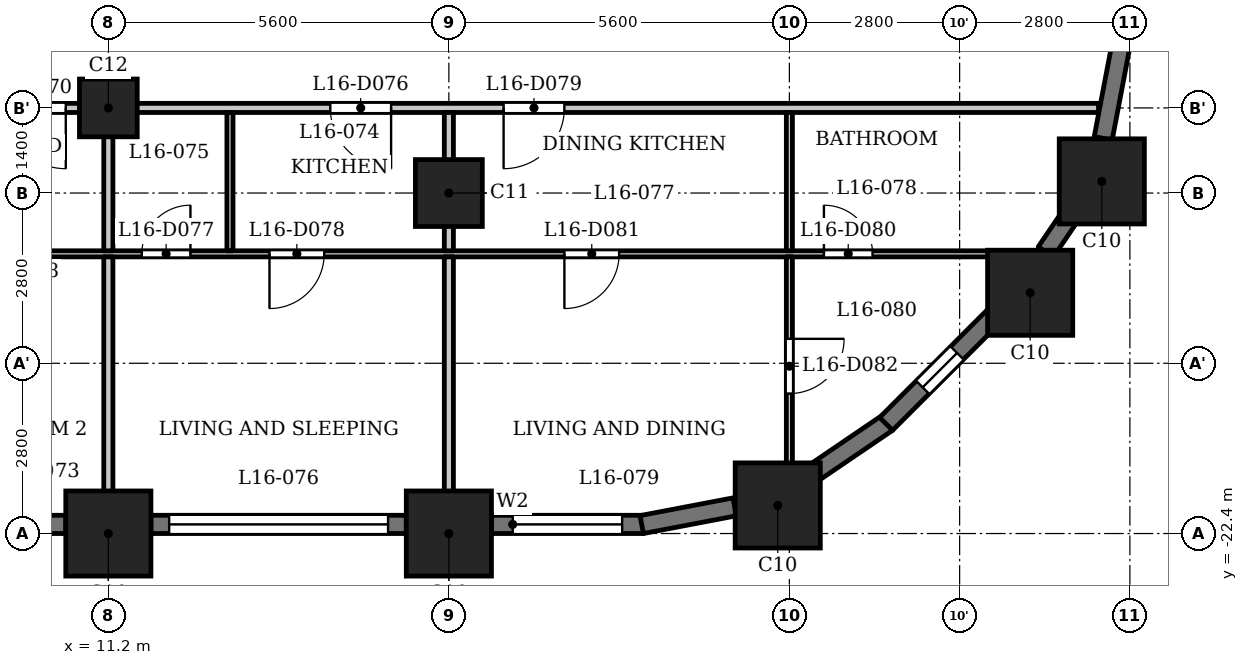
"""IFC4 building model, lengths in metres.
Left out: names, types, materials, properties, quantities, classifications, styles, units other than length and angle.
Written with IfcOpenShell. Run it as: python <this file> out.ifc"""

import sys

from ifc_helpers import new_model, si_unit, direction, frame, frame_2d, origin, origin_2d, place, context, subcontext, project, spatial, rectangle, extrude, element, fill, save


model = new_model("IFC4")
c1 = context("Model", 3, precision=1e-05, world=origin(), true_north=direction((0.0, 1.0)))
c2 = subcontext(c1, "Body", "Model", "MODEL_VIEW")
j1 = project(units=[si_unit("LENGTHUNIT", "METRE"), si_unit("PLANEANGLEUNIT", "RADIAN")], contexts=[c1])
p1 = place(None, origin())
s1 = spatial("IfcSite", under=j1, at=p1, CompositionType="ELEMENT")
p2 = place(p1, origin())
s2 = spatial("IfcBuilding", under=s1, at=p2, CompositionType="ELEMENT")
p3 = place(p2, frame((0.0, 0.0, 65.5)))
s3 = spatial("IfcBuildingStorey", under=s2, at=p3, CompositionType="ELEMENT", Elevation=65.5)
for number, where, z_axis, x_axis in (
    (1, (11.2, -22.4, 0.0), (0.0, 0.0, 1.0), (1.0, 0.0, 0.0)),
    (2, (16.8, -22.4, 0.0), (0.0, 0.0, 1.0), (1.0, 0.0, 0.0)),
    (3, (22.209, -21.938, 0.0), (0.0, 0.0, 1.0), (1.0, 0.0, 0.0)),
    (4, (26.36, -18.44, 0.0), (0.0, 0.0, 1.0), (1.0, 0.0, 0.0)),
    (5, (27.538, -16.609, 0.0), (0.0, 0.0, 1.0), (1.0, 0.0, 0.0)),
):
    element("IfcColumn", number, at=place(p3, frame(where, z_axis=z_axis, x_axis=x_axis)), inside=s3, PredefinedType="COLUMN", context=c2, shape_type="SweptSolid", body=[
        extrude(rectangle(XDim=1.4, YDim=1.4, at=origin_2d()), origin(), (0.0, 0.0, 1.0), 3.5),
    ])
p4 = place(p3, frame((16.8, -16.8, 0.0), z_axis=(0.0, 0.0, 1.0), x_axis=(1.0, 0.0, 0.0)))
e6 = element("IfcColumn", 6, at=p4, inside=s3, PredefinedType="COLUMN", context=c2, shape_type="SweptSolid", body=[
    extrude(rectangle(XDim=1.1, YDim=1.1, at=origin_2d()), origin(), (0.0, 0.0, 1.0), 3.5),
])
p5 = place(p3, frame((11.2, -15.4, 0.0), z_axis=(0.0, 0.0, 1.0), x_axis=(1.0, 0.0, 0.0)))
e7 = element("IfcColumn", 7, at=p5, inside=s3, PredefinedType="COLUMN", context=c2, shape_type="SweptSolid", body=[
    extrude(rectangle(XDim=0.95, YDim=0.95, at=origin_2d()), origin(), (0.0, 0.0, 1.0), 3.5),
])
p6 = place(p3, frame((6.3, -22.25, 0.0), z_axis=(0.0, 0.0, 1.0), x_axis=(1.0, 0.0, 0.0)))
e8 = element("IfcWall", 8, at=p6, inside=s3, PredefinedType="SOLIDWALL", context=c2, shape_type="SweptSolid", body=[
    extrude(rectangle(XDim=4.2, YDim=0.3, at=frame_2d((2.1, 0.0))), origin(), (0.0, 0.0, 1.0), 2.35),
])
p7 = place(p6, frame((0.413, 0.0, 0.6)))
e9 = element("IfcOpeningElement", 9, at=p7, cuts=e8, PredefinedType="OPENING", context=c2, shape_type="SweptSolid", body=[
    extrude(rectangle(XDim=1.2, YDim=1.55, at=frame_2d((0.6, 0.775))), frame((0.0, 0.16, 0.0), z_axis=(0.0, -1.0, 0.0), x_axis=(1.0, 0.0, 0.0)), (0.0, 0.0, 1.0), 0.32),
])
p8 = place(p6, frame((2.587, 0.0, 0.6)))
e10 = element("IfcOpeningElement", 10, at=p8, cuts=e8, PredefinedType="OPENING", context=c2, shape_type="SweptSolid", body=[
    extrude(rectangle(XDim=1.2, YDim=1.55, at=frame_2d((0.6, 0.775))), frame((0.0, 0.16, 0.0), z_axis=(0.0, -1.0, 0.0), x_axis=(1.0, 0.0, 0.0)), (0.0, 0.0, 1.0), 0.32),
])
p9 = place(p3, frame((11.9, -22.25, 0.0), z_axis=(0.0, 0.0, 1.0), x_axis=(1.0, 0.0, 0.0)))
e11 = element("IfcWall", 11, at=p9, inside=s3, PredefinedType="SOLIDWALL", context=c2, shape_type="SweptSolid", body=[
    extrude(rectangle(XDim=4.2, YDim=0.3, at=frame_2d((2.1, 0.0))), origin(), (0.0, 0.0, 1.0), 2.35),
])
p10 = place(p9, frame((0.3, 0.0, 1.2)))
e12 = element("IfcOpeningElement", 12, at=p10, cuts=e11, PredefinedType="OPENING", context=c2, shape_type="SweptSolid", body=[
    extrude(rectangle(XDim=3.6, YDim=0.95, at=frame_2d((1.8, 0.475))), frame((0.0, 0.16, 0.0), z_axis=(0.0, -1.0, 0.0), x_axis=(1.0, 0.0, 0.0)), (0.0, 0.0, 1.0), 0.32),
])
p11 = place(p3, frame((17.5, -22.25, 0.0), z_axis=(0.0, 0.0, 1.0), x_axis=(1.0, 0.0, 0.0)))
e13 = element("IfcWall", 13, at=p11, inside=s3, PredefinedType="SOLIDWALL", context=c2, shape_type="SweptSolid", body=[
    extrude(rectangle(XDim=2.5, YDim=0.3, at=frame_2d((1.25, 0.0))), origin(), (0.0, 0.0, 1.0), 2.35),
])
p12 = place(p11, frame((0.35, 0.0, 0.9)))
e14 = element("IfcOpeningElement", 14, at=p12, cuts=e13, PredefinedType="OPENING", context=c2, shape_type="SweptSolid", body=[
    extrude(rectangle(XDim=1.8, YDim=1.25, at=frame_2d((0.9, 0.625))), frame((0.0, 0.16, 0.0), z_axis=(0.0, -1.0, 0.0), x_axis=(1.0, 0.0, 0.0)), (0.0, 0.0, 1.0), 0.32),
])
p13 = place(p3, frame((19.972, -22.253, 0.0), z_axis=(0.0, 0.0, 1.0), x_axis=(0.982297345734, 0.187328386968, 0.0)))
e15 = element("IfcWall", 15, at=p13, inside=s3, PredefinedType="SOLIDWALL", context=c2, shape_type="SweptSolid", body=[
    extrude(rectangle(XDim=1.556, YDim=0.3, at=frame_2d((0.778, 0.0))), origin(), (0.0, 0.0, 1.0), 2.35),
])
p14 = place(p3, frame((22.726, -21.454, 0.0), z_axis=(0.0, 0.0, 1.0), x_axis=(0.827019875346, 0.562172683241, 0.0)))
e16 = element("IfcWall", 16, at=p14, inside=s3, PredefinedType="SOLIDWALL", context=c2, shape_type="SweptSolid", body=[
    extrude(rectangle(XDim=1.556, YDim=0.3, at=frame_2d((0.778, 0.0))), origin(), (0.0, 0.0, 1.0), 2.35),
])
p15 = place(p3, frame((23.991, -20.597, 0.0), z_axis=(0.0, 0.0, 1.0), x_axis=(0.707106781187, 0.707106781187, 0.0)))
e17 = element("IfcWall", 17, at=p15, inside=s3, PredefinedType="SOLIDWALL", context=c2, shape_type="SweptSolid", body=[
    extrude(rectangle(XDim=2.5, YDim=0.3, at=frame_2d((1.25, 0.0))), origin(), (0.0, 0.0, 1.0), 2.35),
])
p16 = place(p15, frame((0.85, 0.0, 0.6)))
e18 = element("IfcOpeningElement", 18, at=p16, cuts=e17, PredefinedType="OPENING", context=c2, shape_type="SweptSolid", body=[
    extrude(rectangle(XDim=0.8, YDim=1.55, at=frame_2d((0.4, 0.775))), frame((0.0, 0.16, 0.0), z_axis=(0.0, -1.0, 0.0), x_axis=(1.0, 0.0, 0.0)), (0.0, 0.0, 1.0), 0.32),
])
p17 = place(p3, frame((26.617, -17.769, 0.0), z_axis=(0.0, 0.0, 1.0), x_axis=(0.562000651531, 0.827136788977, 0.0)))
e19 = element("IfcWall", 19, at=p17, inside=s3, PredefinedType="SOLIDWALL", context=c2, shape_type="SweptSolid", body=[
    extrude(rectangle(XDim=0.777, YDim=0.3, at=frame_2d((0.389, 0.0))), origin(), (0.0, 0.0, 1.0), 3.2),
])
p18 = place(p3, frame((27.561, -15.9, 0.0), z_axis=(0.0, 0.0, 1.0), x_axis=(0.187328386968, 0.982297345734, 0.0)))
e20 = element("IfcWall", 20, at=p18, inside=s3, PredefinedType="SOLIDWALL", context=c2, shape_type="SweptSolid", body=[
    extrude(rectangle(XDim=1.556, YDim=0.3, at=frame_2d((0.778, 0.0))), origin(), (0.0, 0.0, 1.0), 2.35),
])
p19 = place(p3, frame((-26.394, -17.8, 0.0), z_axis=(0.0, 0.0, 1.0), x_axis=(1.0, 0.0, 0.0)))
e21 = element("IfcWall", 21, at=p19, inside=s3, PredefinedType="PARTITIONING", context=c2, shape_type="SweptSolid", body=[
    extrude(rectangle(XDim=53.034, YDim=0.1, at=frame_2d((26.517, 0.0))), origin(), (0.0, 0.0, 1.0), 3.2),
])
p20 = place(p19, frame((0.794, 0.0, 0.0)))
e22 = element("IfcOpeningElement", 22, at=p20, cuts=e21, PredefinedType="OPENING", context=c2, shape_type="SweptSolid", body=[
    extrude(rectangle(XDim=0.8, YDim=2.1, at=frame_2d((0.4, 1.05))), frame((0.0, 0.06, 0.0), z_axis=(0.0, -1.0, 0.0), x_axis=(1.0, 0.0, 0.0)), (0.0, 0.0, 1.0), 0.12),
])
p21 = place(p19, frame((5.644, 0.0, 0.0)))
e23 = element("IfcOpeningElement", 23, at=p21, cuts=e21, PredefinedType="OPENING", context=c2, shape_type="SweptSolid", body=[
    extrude(rectangle(XDim=0.9, YDim=2.1, at=frame_2d((0.45, 1.05))), frame((0.0, 0.06, 0.0), z_axis=(0.0, -1.0, 0.0), x_axis=(1.0, 0.0, 0.0)), (0.0, 0.0, 1.0), 0.12),
])
p22 = place(p19, frame((10.494, 0.0, 0.0)))
e24 = element("IfcOpeningElement", 24, at=p22, cuts=e21, PredefinedType="OPENING", context=c2, shape_type="SweptSolid", body=[
    extrude(rectangle(XDim=0.8, YDim=2.1, at=frame_2d((0.4, 1.05))), frame((0.0, 0.06, 0.0), z_axis=(0.0, -1.0, 0.0), x_axis=(1.0, 0.0, 0.0)), (0.0, 0.0, 1.0), 0.12),
])
p23 = place(p19, frame((13.844, 0.0, 0.0)))
e25 = element("IfcOpeningElement", 25, at=p23, cuts=e21, PredefinedType="OPENING", context=c2, shape_type="SweptSolid", body=[
    extrude(rectangle(XDim=0.9, YDim=2.1, at=frame_2d((0.45, 1.05))), frame((0.0, 0.06, 0.0), z_axis=(0.0, -1.0, 0.0), x_axis=(1.0, 0.0, 0.0)), (0.0, 0.0, 1.0), 0.12),
])
p24 = place(p19, frame((19.344, 0.0, 0.0)))
e26 = element("IfcOpeningElement", 26, at=p24, cuts=e21, PredefinedType="OPENING", context=c2, shape_type="SweptSolid", body=[
    extrude(rectangle(XDim=0.8, YDim=2.1, at=frame_2d((0.4, 1.05))), frame((0.0, 0.06, 0.0), z_axis=(0.0, -1.0, 0.0), x_axis=(1.0, 0.0, 0.0)), (0.0, 0.0, 1.0), 0.12),
])
p25 = place(p19, frame((16.094, 0.0, 0.0)))
e27 = element("IfcOpeningElement", 27, at=p25, cuts=e21, PredefinedType="OPENING", context=c2, shape_type="SweptSolid", body=[
    extrude(rectangle(XDim=0.9, YDim=2.1, at=frame_2d((0.45, 1.05))), frame((0.0, 0.06, 0.0), z_axis=(0.0, -1.0, 0.0), x_axis=(1.0, 0.0, 0.0)), (0.0, 0.0, 1.0), 0.12),
])
p26 = place(p19, frame((24.944, 0.0, 0.0)))
e28 = element("IfcOpeningElement", 28, at=p26, cuts=e21, PredefinedType="OPENING", context=c2, shape_type="SweptSolid", body=[
    extrude(rectangle(XDim=0.8, YDim=2.1, at=frame_2d((0.4, 1.05))), frame((0.0, 0.06, 0.0), z_axis=(0.0, -1.0, 0.0), x_axis=(1.0, 0.0, 0.0)), (0.0, 0.0, 1.0), 0.12),
])
p27 = place(p19, frame((22.444, 0.0, 0.0)))
e29 = element("IfcOpeningElement", 29, at=p27, cuts=e21, PredefinedType="OPENING", context=c2, shape_type="SweptSolid", body=[
    extrude(rectangle(XDim=0.9, YDim=2.1, at=frame_2d((0.45, 1.05))), frame((0.0, 0.06, 0.0), z_axis=(0.0, -1.0, 0.0), x_axis=(1.0, 0.0, 0.0)), (0.0, 0.0, 1.0), 0.12),
])
p28 = place(p19, frame((26.944, 0.0, 0.0)))
e30 = element("IfcOpeningElement", 30, at=p28, cuts=e21, PredefinedType="OPENING", context=c2, shape_type="SweptSolid", body=[
    extrude(rectangle(XDim=0.8, YDim=2.1, at=frame_2d((0.4, 1.05))), frame((0.0, 0.06, 0.0), z_axis=(0.0, -1.0, 0.0), x_axis=(1.0, 0.0, 0.0)), (0.0, 0.0, 1.0), 0.12),
])
p29 = place(p19, frame((29.794, 0.0, 0.0)))
e31 = element("IfcOpeningElement", 31, at=p29, cuts=e21, PredefinedType="OPENING", context=c2, shape_type="SweptSolid", body=[
    extrude(rectangle(XDim=0.9, YDim=2.1, at=frame_2d((0.45, 1.05))), frame((0.0, 0.06, 0.0), z_axis=(0.0, -1.0, 0.0), x_axis=(1.0, 0.0, 0.0)), (0.0, 0.0, 1.0), 0.12),
])
p30 = place(p19, frame((33.394, 0.0, 0.0)))
e32 = element("IfcOpeningElement", 32, at=p30, cuts=e21, PredefinedType="OPENING", context=c2, shape_type="SweptSolid", body=[
    extrude(rectangle(XDim=0.9, YDim=2.1, at=frame_2d((0.45, 1.05))), frame((0.0, 0.06, 0.0), z_axis=(0.0, -1.0, 0.0), x_axis=(1.0, 0.0, 0.0)), (0.0, 0.0, 1.0), 0.12),
])
p31 = place(p19, frame((34.944, 0.0, 0.0)))
e33 = element("IfcOpeningElement", 33, at=p31, cuts=e21, PredefinedType="OPENING", context=c2, shape_type="SweptSolid", body=[
    extrude(rectangle(XDim=0.9, YDim=2.1, at=frame_2d((0.45, 1.05))), frame((0.0, 0.06, 0.0), z_axis=(0.0, -1.0, 0.0), x_axis=(1.0, 0.0, 0.0)), (0.0, 0.0, 1.0), 0.12),
])
p32 = place(p19, frame((38.144, 0.0, 0.0)))
e34 = element("IfcOpeningElement", 34, at=p32, cuts=e21, PredefinedType="OPENING", context=c2, shape_type="SweptSolid", body=[
    extrude(rectangle(XDim=0.8, YDim=2.1, at=frame_2d((0.4, 1.05))), frame((0.0, 0.06, 0.0), z_axis=(0.0, -1.0, 0.0), x_axis=(1.0, 0.0, 0.0)), (0.0, 0.0, 1.0), 0.12),
])
p33 = place(p19, frame((40.244, 0.0, 0.0)))
e35 = element("IfcOpeningElement", 35, at=p33, cuts=e21, PredefinedType="OPENING", context=c2, shape_type="SweptSolid", body=[
    extrude(rectangle(XDim=0.9, YDim=2.1, at=frame_2d((0.45, 1.05))), frame((0.0, 0.06, 0.0), z_axis=(0.0, -1.0, 0.0), x_axis=(1.0, 0.0, 0.0)), (0.0, 0.0, 1.0), 0.12),
])
p34 = place(p19, frame((49.362, 0.0, 0.0)))
e36 = element("IfcOpeningElement", 36, at=p34, cuts=e21, PredefinedType="OPENING", context=c2, shape_type="SweptSolid", body=[
    extrude(rectangle(XDim=0.8, YDim=2.1, at=frame_2d((0.4, 1.05))), frame((0.0, 0.06, 0.0), z_axis=(0.0, -1.0, 0.0), x_axis=(1.0, 0.0, 0.0)), (0.0, 0.0, 1.0), 0.12),
])
p35 = place(p19, frame((45.094, 0.0, 0.0)))
e37 = element("IfcOpeningElement", 37, at=p35, cuts=e21, PredefinedType="OPENING", context=c2, shape_type="SweptSolid", body=[
    extrude(rectangle(XDim=0.9, YDim=2.1, at=frame_2d((0.45, 1.05))), frame((0.0, 0.06, 0.0), z_axis=(0.0, -1.0, 0.0), x_axis=(1.0, 0.0, 0.0)), (0.0, 0.0, 1.0), 0.12),
])
p36 = place(p3, frame((-27.484, -15.4, 0.0), z_axis=(0.0, 0.0, 1.0), x_axis=(1.0, 0.0, 0.0)))
e38 = element("IfcWall", 38, at=p36, inside=s3, PredefinedType="PARTITIONING", context=c2, shape_type="SweptSolid", body=[
    extrude(rectangle(XDim=54.968, YDim=0.15, at=frame_2d((27.484, 0.0))), origin(), (0.0, 0.0, 1.0), 3.2),
])
p37 = place(p36, frame((5.734, 0.0, 0.0)))
e39 = element("IfcOpeningElement", 39, at=p37, cuts=e38, PredefinedType="OPENING", context=c2, shape_type="SweptSolid", body=[
    extrude(rectangle(XDim=1.0, YDim=2.1, at=frame_2d((0.5, 1.05))), frame((0.0, 0.085, 0.0), z_axis=(0.0, -1.0, 0.0), x_axis=(1.0, 0.0, 0.0)), (0.0, 0.0, 1.0), 0.17),
])
p38 = place(p36, frame((13.934, 0.0, 0.0)))
e40 = element("IfcOpeningElement", 40, at=p38, cuts=e38, PredefinedType="OPENING", context=c2, shape_type="SweptSolid", body=[
    extrude(rectangle(XDim=1.0, YDim=2.1, at=frame_2d((0.5, 1.05))), frame((0.0, 0.085, 0.0), z_axis=(0.0, -1.0, 0.0), x_axis=(1.0, 0.0, 0.0)), (0.0, 0.0, 1.0), 0.17),
])
p39 = place(p36, frame((18.184, 0.0, 0.0)))
e41 = element("IfcOpeningElement", 41, at=p39, cuts=e38, PredefinedType="OPENING", context=c2, shape_type="SweptSolid", body=[
    extrude(rectangle(XDim=1.0, YDim=2.1, at=frame_2d((0.5, 1.05))), frame((0.0, 0.085, 0.0), z_axis=(0.0, -1.0, 0.0), x_axis=(1.0, 0.0, 0.0)), (0.0, 0.0, 1.0), 0.17),
])
p40 = place(p36, frame((22.534, 0.0, 0.0)))
e42 = element("IfcOpeningElement", 42, at=p40, cuts=e38, PredefinedType="OPENING", context=c2, shape_type="SweptSolid", body=[
    extrude(rectangle(XDim=1.0, YDim=2.1, at=frame_2d((0.5, 1.05))), frame((0.0, 0.085, 0.0), z_axis=(0.0, -1.0, 0.0), x_axis=(1.0, 0.0, 0.0)), (0.0, 0.0, 1.0), 0.17),
])
p41 = place(p36, frame((36.984, 0.0, 0.0)))
e43 = element("IfcOpeningElement", 43, at=p41, cuts=e38, PredefinedType="OPENING", context=c2, shape_type="SweptSolid", body=[
    extrude(rectangle(XDim=1.0, YDim=2.1, at=frame_2d((0.5, 1.05))), frame((0.0, 0.085, 0.0), z_axis=(0.0, -1.0, 0.0), x_axis=(1.0, 0.0, 0.0)), (0.0, 0.0, 1.0), 0.17),
])
p42 = place(p36, frame((42.334, 0.0, 0.0)))
e44 = element("IfcOpeningElement", 44, at=p42, cuts=e38, PredefinedType="OPENING", context=c2, shape_type="SweptSolid", body=[
    extrude(rectangle(XDim=1.0, YDim=2.1, at=frame_2d((0.5, 1.05))), frame((0.0, 0.085, 0.0), z_axis=(0.0, -1.0, 0.0), x_axis=(1.0, 0.0, 0.0)), (0.0, 0.0, 1.0), 0.17),
])
p43 = place(p36, frame((45.184, 0.0, 0.0)))
e45 = element("IfcOpeningElement", 45, at=p43, cuts=e38, PredefinedType="OPENING", context=c2, shape_type="SweptSolid", body=[
    extrude(rectangle(XDim=1.0, YDim=2.1, at=frame_2d((0.5, 1.05))), frame((0.0, 0.085, 0.0), z_axis=(0.0, -1.0, 0.0), x_axis=(1.0, 0.0, 0.0)), (0.0, 0.0, 1.0), 0.17),
])
p44 = place(p3, frame((11.2, -23.08, 0.0), z_axis=(0.0, 0.0, 1.0), x_axis=(0.0, 1.0, 0.0)))
e46 = element("IfcWall", 46, at=p44, inside=s3, PredefinedType="PARTITIONING", context=c2, shape_type="SweptSolid", body=[
    extrude(rectangle(XDim=5.23, YDim=0.15, at=frame_2d((2.615, 0.0))), origin(), (0.0, 0.0, 1.0), 3.2),
])
p45 = place(p3, frame((11.2, -17.75, 0.0), z_axis=(0.0, 0.0, 1.0), x_axis=(0.0, 1.0, 0.0)))
e47 = element("IfcWall", 47, at=p45, inside=s3, PredefinedType="PARTITIONING", context=c2, shape_type="SweptSolid", body=[
    extrude(rectangle(XDim=2.275, YDim=0.15, at=frame_2d((1.137, 0.0))), origin(), (0.0, 0.0, 1.0), 3.2),
])
p46 = place(p3, frame((13.2, -17.75, 0.0), z_axis=(0.0, 0.0, 1.0), x_axis=(0.0, 1.0, 0.0)))
e48 = element("IfcWall", 48, at=p46, inside=s3, PredefinedType="PARTITIONING", context=c2, shape_type="SweptSolid", body=[
    extrude(rectangle(XDim=2.275, YDim=0.1, at=frame_2d((1.137, 0.0))), origin(), (0.0, 0.0, 1.0), 3.2),
])
p47 = place(p3, frame((16.8, -23.08, 0.0), z_axis=(0.0, 0.0, 1.0), x_axis=(0.0, 1.0, 0.0)))
e49 = element("IfcWall", 49, at=p47, inside=s3, PredefinedType="PARTITIONING", context=c2, shape_type="SweptSolid", body=[
    extrude(rectangle(XDim=5.23, YDim=0.15, at=frame_2d((2.615, 0.0))), origin(), (0.0, 0.0, 1.0), 3.2),
])
p48 = place(p3, frame((16.8, -17.75, 0.0), z_axis=(0.0, 0.0, 1.0), x_axis=(0.0, 1.0, 0.0)))
e50 = element("IfcWall", 50, at=p48, inside=s3, PredefinedType="PARTITIONING", context=c2, shape_type="SweptSolid", body=[
    extrude(rectangle(XDim=2.275, YDim=0.15, at=frame_2d((1.137, 0.0))), origin(), (0.0, 0.0, 1.0), 3.2),
])
p49 = place(p3, frame((22.4, -21.72, 0.0), z_axis=(0.0, 0.0, 1.0), x_axis=(0.0, 1.0, 0.0)))
e51 = element("IfcWall", 51, at=p49, inside=s3, PredefinedType="PARTITIONING", context=c2, shape_type="SweptSolid", body=[
    extrude(rectangle(XDim=3.87, YDim=0.1, at=frame_2d((1.935, 0.0))), origin(), (0.0, 0.0, 1.0), 3.2),
])
p50 = place(p49, frame((1.622, 0.0, 0.0)))
e52 = element("IfcOpeningElement", 52, at=p50, cuts=e51, PredefinedType="OPENING", context=c2, shape_type="SweptSolid", body=[
    extrude(rectangle(XDim=0.9, YDim=2.1, at=frame_2d((0.45, 1.05))), frame((0.0, 0.06, 0.0), z_axis=(0.0, -1.0, 0.0), x_axis=(1.0, 0.0, 0.0)), (0.0, 0.0, 1.0), 0.12),
])
p51 = place(p3, frame((22.4, -17.75, 0.0), z_axis=(0.0, 0.0, 1.0), x_axis=(0.0, 1.0, 0.0)))
e53 = element("IfcWall", 53, at=p51, inside=s3, PredefinedType="PARTITIONING", context=c2, shape_type="SweptSolid", body=[
    extrude(rectangle(XDim=2.275, YDim=0.1, at=frame_2d((1.137, 0.0))), origin(), (0.0, 0.0, 1.0), 3.2),
])
p52 = place(p41, origin())
e54 = element("IfcDoor", 54, at=p52, inside=s3, OperationType="SINGLE_SWING_RIGHT", PredefinedType="DOOR", context=c2, shape_type="SweptSolid", body=[
    extrude(rectangle(XDim=1.0, YDim=2.1, at=frame_2d((0.5, 1.05))), frame((0.0, 0.025, 0.0), z_axis=(0.0, -1.0, 0.0), x_axis=(1.0, 0.0, 0.0)), (0.0, 0.0, 1.0), 0.05),
])
fill(e43, e54)
p53 = place(p42, origin())
e55 = element("IfcDoor", 55, at=p53, inside=s3, OperationType="SINGLE_SWING_RIGHT", PredefinedType="DOOR", context=c2, shape_type="SweptSolid", body=[
    extrude(rectangle(XDim=1.0, YDim=2.1, at=frame_2d((0.5, 1.05))), frame((0.0, 0.025, 0.0), z_axis=(0.0, -1.0, 0.0), x_axis=(1.0, 0.0, 0.0)), (0.0, 0.0, 1.0), 0.05),
])
fill(e44, e55)
p54 = place(p32, origin())
e56 = element("IfcDoor", 56, at=p54, inside=s3, OperationType="SINGLE_SWING_LEFT", PredefinedType="DOOR", context=c2, shape_type="SweptSolid", body=[
    extrude(rectangle(XDim=0.8, YDim=2.1, at=frame_2d((0.4, 1.05))), frame((0.0, 0.025, 0.0), z_axis=(0.0, -1.0, 0.0), x_axis=(1.0, 0.0, 0.0)), (0.0, 0.0, 1.0), 0.05),
])
fill(e34, e56)
p55 = place(p33, origin())
e57 = element("IfcDoor", 57, at=p55, inside=s3, OperationType="SINGLE_SWING_LEFT", PredefinedType="DOOR", context=c2, shape_type="SweptSolid", body=[
    extrude(rectangle(XDim=0.9, YDim=2.1, at=frame_2d((0.45, 1.05))), frame((0.0, 0.025, 0.0), z_axis=(0.0, -1.0, 0.0), x_axis=(1.0, 0.0, 0.0)), (0.0, 0.0, 1.0), 0.05),
])
fill(e35, e57)
p56 = place(p43, origin())
e58 = element("IfcDoor", 58, at=p56, inside=s3, OperationType="SINGLE_SWING_LEFT", PredefinedType="DOOR", context=c2, shape_type="SweptSolid", body=[
    extrude(rectangle(XDim=1.0, YDim=2.1, at=frame_2d((0.5, 1.05))), frame((0.0, 0.025, 0.0), z_axis=(0.0, -1.0, 0.0), x_axis=(1.0, 0.0, 0.0)), (0.0, 0.0, 1.0), 0.05),
])
fill(e45, e58)
p57 = place(p34, origin())
e59 = element("IfcDoor", 59, at=p57, inside=s3, OperationType="SINGLE_SWING_RIGHT", PredefinedType="DOOR", context=c2, shape_type="SweptSolid", body=[
    extrude(rectangle(XDim=0.8, YDim=2.1, at=frame_2d((0.4, 1.05))), frame((0.0, 0.025, 0.0), z_axis=(0.0, -1.0, 0.0), x_axis=(1.0, 0.0, 0.0)), (0.0, 0.0, 1.0), 0.05),
])
fill(e36, e59)
p58 = place(p35, origin())
e60 = element("IfcDoor", 60, at=p58, inside=s3, OperationType="SINGLE_SWING_LEFT", PredefinedType="DOOR", context=c2, shape_type="SweptSolid", body=[
    extrude(rectangle(XDim=0.9, YDim=2.1, at=frame_2d((0.45, 1.05))), frame((0.0, 0.025, 0.0), z_axis=(0.0, -1.0, 0.0), x_axis=(1.0, 0.0, 0.0)), (0.0, 0.0, 1.0), 0.05),
])
fill(e37, e60)
p59 = place(p50, origin())
e61 = element("IfcDoor", 61, at=p59, inside=s3, OperationType="SINGLE_SWING_RIGHT", PredefinedType="DOOR", context=c2, shape_type="SweptSolid", body=[
    extrude(rectangle(XDim=0.9, YDim=2.1, at=frame_2d((0.45, 1.05))), frame((0.0, 0.025, 0.0), z_axis=(0.0, -1.0, 0.0), x_axis=(1.0, 0.0, 0.0)), (0.0, 0.0, 1.0), 0.05),
])
fill(e52, e61)
p60 = place(p10, origin())
e62 = element("IfcWindow", 62, at=p60, inside=s3, PartitioningType="SINGLE_PANEL", PredefinedType="WINDOW", context=c2, shape_type="SweptSolid", body=[
    extrude(rectangle(XDim=3.6, YDim=0.95, at=frame_2d((1.8, 0.475))), frame((0.0, 0.03, 0.0), z_axis=(0.0, -1.0, 0.0), x_axis=(1.0, 0.0, 0.0)), (0.0, 0.0, 1.0), 0.06),
])
fill(e12, e62)
p61 = place(p12, origin())
e63 = element("IfcWindow", 63, at=p61, inside=s3, PartitioningType="SINGLE_PANEL", PredefinedType="WINDOW", context=c2, shape_type="SweptSolid", body=[
    extrude(rectangle(XDim=1.8, YDim=1.25, at=frame_2d((0.9, 0.625))), frame((0.0, 0.03, 0.0), z_axis=(0.0, -1.0, 0.0), x_axis=(1.0, 0.0, 0.0)), (0.0, 0.0, 1.0), 0.06),
])
fill(e14, e63)
p62 = place(p16, origin())
e64 = element("IfcWindow", 64, at=p62, inside=s3, PartitioningType="SINGLE_PANEL", PredefinedType="WINDOW", context=c2, shape_type="SweptSolid", body=[
    extrude(rectangle(XDim=0.8, YDim=1.55, at=frame_2d((0.4, 0.775))), frame((0.0, 0.03, 0.0), z_axis=(0.0, -1.0, 0.0), x_axis=(1.0, 0.0, 0.0)), (0.0, 0.0, 1.0), 0.06),
])
fill(e18, e64)
save(model, sys.argv[1])
